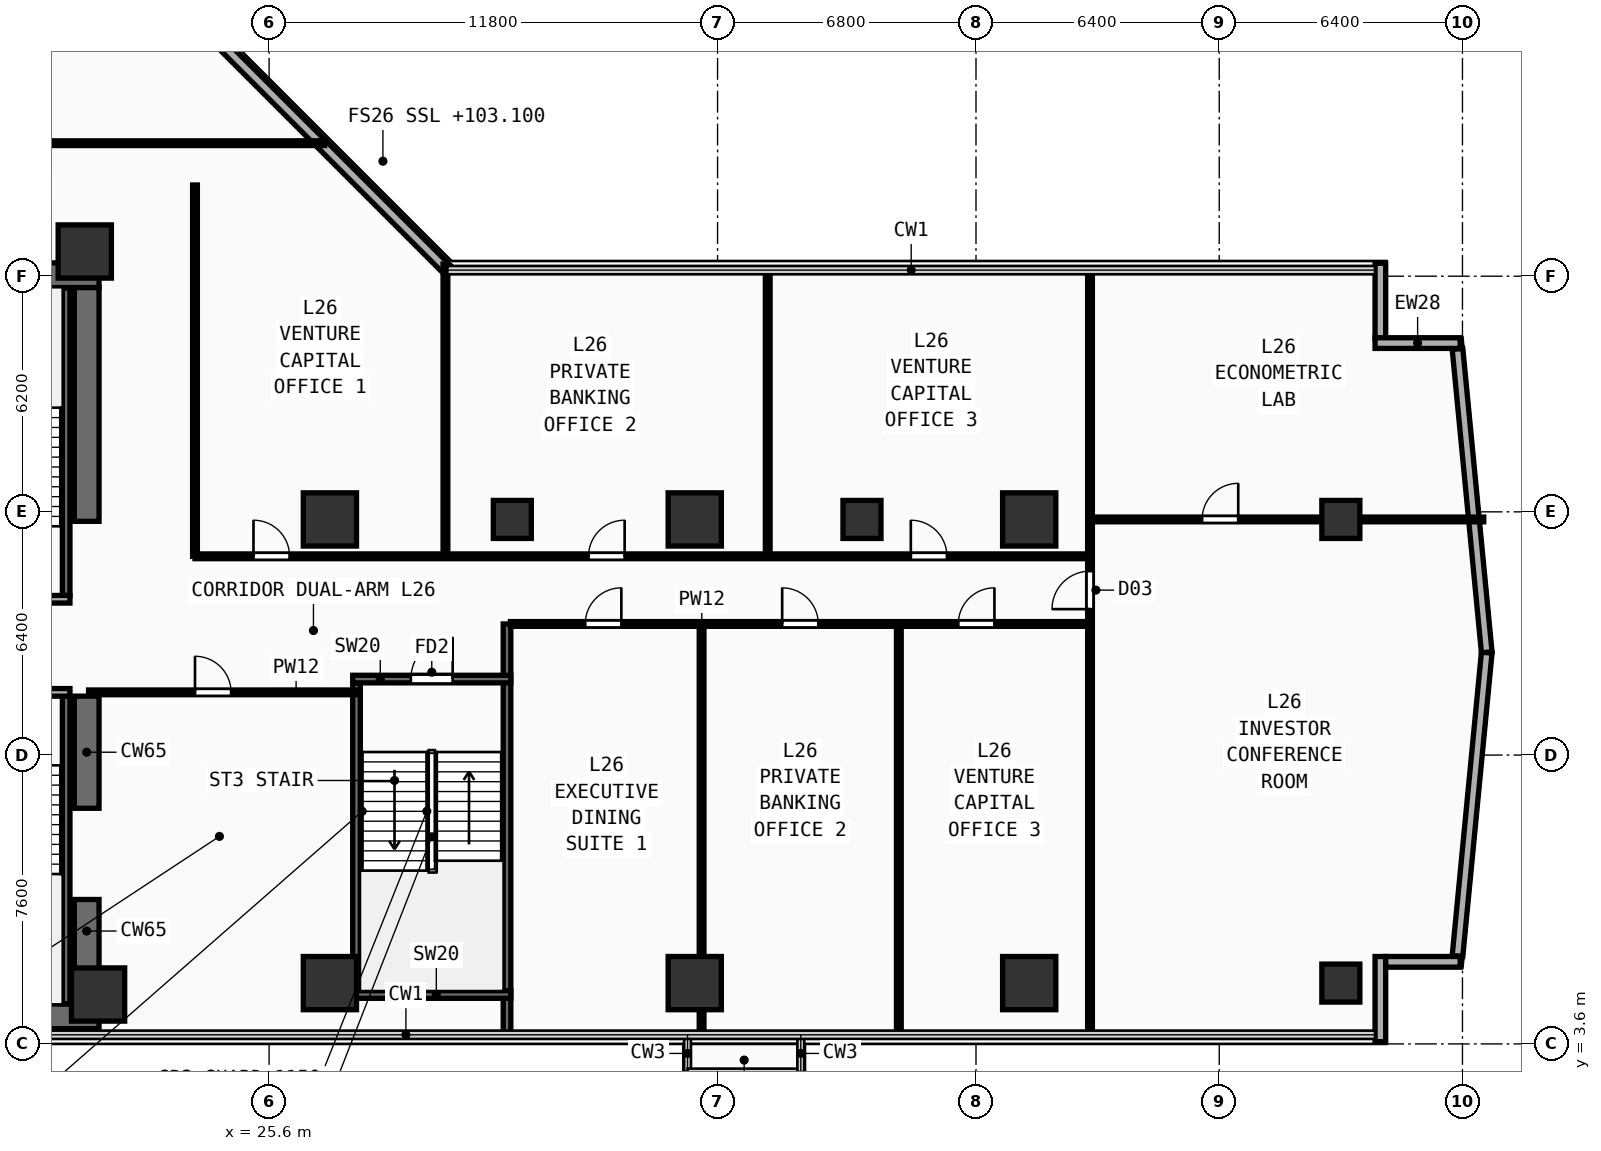
"""IFC4 building model, lengths in metres.
Left out: names, types, materials, properties, quantities, classifications, styles, units other than length and angle.
Written with IfcOpenShell. Run it as: python <this file> out.ifc"""

import sys

from ifc_helpers import new_model, si_unit, direction, frame, frame_2d, origin, origin_2d, place, context, subcontext, project, spatial, rectangle, extrude, element, fill, save


model = new_model("IFC4")
c1 = context("Model", 3, precision=1e-05, world=origin(), true_north=direction((0.0, 1.0)))
c2 = subcontext(c1, "Body", "Model", "MODEL_VIEW")
j1 = project(units=[si_unit("LENGTHUNIT", "METRE"), si_unit("PLANEANGLEUNIT", "RADIAN")], contexts=[c1])
p1 = place(None, origin())
s1 = spatial("IfcSite", under=j1, at=p1, CompositionType="ELEMENT")
p2 = place(p1, origin())
s2 = spatial("IfcBuilding", under=s1, at=p2, CompositionType="ELEMENT")
p3 = place(p2, frame((0.0, 0.0, 103.1)))
s3 = spatial("IfcBuildingStorey", under=s2, at=p3, CompositionType="ELEMENT", Elevation=103.1)
for number, where, z_axis, x_axis in (
    (1, (7.125, 4.325, 0.0), (0.0, 0.0, 1.0), (1.0, 0.0, 0.0)),
    (2, (7.125, 23.825, 0.0), (0.0, 0.0, 1.0), (1.0, 0.0, 0.0)),
):
    element("IfcWall", number, at=place(p3, frame(where, z_axis=z_axis, x_axis=x_axis)), inside=s3, PredefinedType="SHEAR", context=c2, shape_type="SweptSolid", body=[
        extrude(rectangle(XDim=14.0, YDim=0.65, at=frame_2d((7.0, 0.0))), origin(), (0.0, 0.0, 1.0), 3.54),
    ])
p4 = place(p3, frame((20.8, 4.65, 0.0), z_axis=(0.0, 0.0, 1.0), x_axis=(0.0, 1.0, 0.0)))
e3 = element("IfcWall", 3, at=p4, inside=s3, PredefinedType="SHEAR", context=c2, shape_type="SweptSolid", body=[
    extrude(rectangle(XDim=2.75, YDim=0.65, at=frame_2d((1.375, 0.0))), origin(), (0.0, 0.0, 1.0), 3.54),
])
p5 = place(p3, frame((20.8, 9.8, 0.0), z_axis=(0.0, 0.0, 1.0), x_axis=(0.0, 1.0, 0.0)))
e4 = element("IfcWall", 4, at=p5, inside=s3, PredefinedType="SHEAR", context=c2, shape_type="SweptSolid", body=[
    extrude(rectangle(XDim=2.95, YDim=0.65, at=frame_2d((1.475, 0.0))), origin(), (0.0, 0.0, 1.0), 3.54),
])
p6 = place(p3, frame((20.8, 17.35, 0.0), z_axis=(0.0, 0.0, 1.0), x_axis=(0.0, 1.0, 0.0)))
e5 = element("IfcWall", 5, at=p6, inside=s3, PredefinedType="SHEAR", context=c2, shape_type="SweptSolid", body=[
    extrude(rectangle(XDim=6.15, YDim=0.65, at=frame_2d((3.075, 0.0))), origin(), (0.0, 0.0, 1.0), 3.54),
])
for number, where, z_axis, x_axis in (
    (6, (21.1, 4.9, 0.0), (0.0, 0.0, 1.0), (1.0, 0.0, 0.0)),
    (7, (20.75, 24.45, 0.0), (0.0, 0.0, 1.0), (1.0, 0.0, 0.0)),
    (8, (27.2, 5.2, 0.0), (0.0, 0.0, 1.0), (1.0, 0.0, 0.0)),
    (9, (36.8, 5.2, 0.0), (0.0, 0.0, 1.0), (1.0, 0.0, 0.0)),
    (10, (45.6, 5.2, 0.0), (0.0, 0.0, 1.0), (1.0, 0.0, 0.0)),
    (11, (27.2, 17.4, 0.0), (0.0, 0.0, 1.0), (1.0, 0.0, 0.0)),
    (12, (36.8, 17.4, 0.0), (0.0, 0.0, 1.0), (1.0, 0.0, 0.0)),
    (13, (45.6, 17.4, 0.0), (0.0, 0.0, 1.0), (1.0, 0.0, 0.0)),
):
    element("IfcColumn", number, at=place(p3, frame(where, z_axis=z_axis, x_axis=x_axis)), inside=s3, PredefinedType="COLUMN", context=c2, shape_type="SweptSolid", body=[
        extrude(rectangle(XDim=1.4, YDim=1.4, at=origin_2d()), origin(), (0.0, 0.0, 1.0), 3.54),
    ])
for number, where, z_axis, x_axis in (
    (14, (53.8, 5.2, 0.0), (0.0, 0.0, 1.0), (1.0, 0.0, 0.0)),
    (15, (53.8, 17.4, 0.0), (0.0, 0.0, 1.0), (1.0, 0.0, 0.0)),
    (16, (32.0, 17.4, 0.0), (0.0, 0.0, 1.0), (1.0, 0.0, 0.0)),
    (17, (41.2, 17.4, 0.0), (0.0, 0.0, 1.0), (1.0, 0.0, 0.0)),
):
    element("IfcColumn", number, at=place(p3, frame(where, z_axis=z_axis, x_axis=x_axis)), inside=s3, PredefinedType="COLUMN", context=c2, shape_type="SweptSolid", body=[
        extrude(rectangle(XDim=1.0, YDim=1.0, at=origin_2d()), origin(), (0.0, 0.0, 1.0), 3.54),
    ])
p7 = place(p3, frame((54.84, 3.66, 0.0), z_axis=(0.0, 0.0, 1.0), x_axis=(0.0, 1.0, 0.0)))
e18 = element("IfcWall", 18, at=p7, inside=s3, PredefinedType="SOLIDWALL", context=c2, shape_type="SweptSolid", body=[
    extrude(rectangle(XDim=2.24, YDim=0.28, at=frame_2d((1.12, 0.0))), origin(), (0.0, 0.0, 1.0), 3.54),
])
p8 = place(p3, frame((54.98, 5.76, 0.0), z_axis=(0.0, 0.0, 1.0), x_axis=(1.0, 0.0, 0.0)))
e19 = element("IfcWall", 19, at=p8, inside=s3, PredefinedType="SOLIDWALL", context=c2, shape_type="SweptSolid", body=[
    extrude(rectangle(XDim=1.96, YDim=0.28, at=frame_2d((0.98, 0.0))), origin(), (0.0, 0.0, 1.0), 3.54),
])
p9 = place(p3, frame((54.84, 22.165, 0.0), z_axis=(0.0, 0.0, 1.0), x_axis=(0.0, 1.0, 0.0)))
e20 = element("IfcWall", 20, at=p9, inside=s3, PredefinedType="SOLIDWALL", context=c2, shape_type="SweptSolid", body=[
    extrude(rectangle(XDim=1.975, YDim=0.28, at=frame_2d((0.987, 0.0))), origin(), (0.0, 0.0, 1.0), 3.54),
])
p10 = place(p3, frame((54.7, 22.04, 0.0), z_axis=(0.0, 0.0, 1.0), x_axis=(1.0, 0.0, 0.0)))
e21 = element("IfcWall", 21, at=p10, inside=s3, PredefinedType="SOLIDWALL", context=c2, shape_type="SweptSolid", body=[
    extrude(rectangle(XDim=2.24, YDim=0.28, at=frame_2d((1.12, 0.0))), origin(), (0.0, 0.0, 1.0), 3.54),
])
p11 = place(p3, frame((30.285, 23.975, 0.0), z_axis=(0.0, 0.0, 1.0), x_axis=(-0.707106781187, 0.707106781187, 0.0)))
e22 = element("IfcWall", 22, at=p11, inside=s3, PredefinedType="SOLIDWALL", context=c2, shape_type="SweptSolid", body=[
    extrude(rectangle(XDim=9.207, YDim=0.28, at=frame_2d((4.603, 0.0))), origin(), (0.0, 0.0, 1.0), 3.54),
])
for number, where, z_axis, x_axis in (
    (23, (56.869, 5.914, 0.0), (0.0, 0.0, 1.0), (0.096, 0.995, 0.0)),
    (24, (57.639, 13.905, 0.0), (0.0, 0.0, 1.0), (-0.096, 0.995, 0.0)),
):
    element("IfcWall", number, at=place(p3, frame(where, z_axis=z_axis, x_axis=x_axis)), inside=s3, PredefinedType="SOLIDWALL", context=c2, shape_type="SweptSolid", body=[
        extrude(rectangle(XDim=8.019, YDim=0.28, at=frame_2d((4.009, 0.0))), origin(), (0.0, 0.0, 1.0), 3.54),
    ])
p12 = place(p3, frame((20.26, 4.66, 0.0), z_axis=(0.0, 0.0, 1.0), x_axis=(0.0, 1.0, 0.0)))
e25 = element("IfcWall", 25, at=p12, inside=s3, PredefinedType="SHEAR", context=c2, shape_type="SweptSolid", body=[
    extrude(rectangle(XDim=8.09, YDim=0.2, at=frame_2d((4.045, 0.0))), origin(), (0.0, 0.0, 1.0), 3.54),
])
p13 = place(p3, frame((16.4, 12.85, 0.0), z_axis=(0.0, 0.0, 1.0), x_axis=(1.0, 0.0, 0.0)))
e26 = element("IfcWall", 26, at=p13, inside=s3, PredefinedType="PARTITIONING", context=c2, shape_type="SweptSolid", body=[
    extrude(rectangle(XDim=3.96, YDim=0.2, at=frame_2d((1.98, 0.0))), origin(), (0.0, 0.0, 1.0), 3.54),
])
p14 = place(p13, frame((1.304, 0.0, 0.0)))
e27 = element("IfcOpeningElement", 27, at=p14, cuts=e26, PredefinedType="OPENING", context=c2, shape_type="SweptSolid", body=[
    extrude(rectangle(XDim=1.1, YDim=2.2, at=frame_2d((0.55, 1.1))), frame((0.0, 0.11, 0.0), z_axis=(0.0, -1.0, 0.0), x_axis=(1.0, 0.0, 0.0)), (0.0, 0.0, 1.0), 0.22),
])
p15 = place(p3, frame((20.26, 15.4, 0.0), z_axis=(0.0, 0.0, 1.0), x_axis=(0.0, 1.0, 0.0)))
e28 = element("IfcWall", 28, at=p15, inside=s3, PredefinedType="SHEAR", context=c2, shape_type="SweptSolid", body=[
    extrude(rectangle(XDim=8.09, YDim=0.2, at=frame_2d((4.045, 0.0))), origin(), (0.0, 0.0, 1.0), 3.54),
])
p16 = place(p3, frame((16.41, 15.3, 0.0), z_axis=(0.0, 0.0, 1.0), x_axis=(1.0, 0.0, 0.0)))
e29 = element("IfcWall", 29, at=p16, inside=s3, PredefinedType="PARTITIONING", context=c2, shape_type="SweptSolid", body=[
    extrude(rectangle(XDim=3.95, YDim=0.2, at=frame_2d((1.975, 0.0))), origin(), (0.0, 0.0, 1.0), 3.54),
])
p17 = place(p16, frame((1.294, 0.0, 0.0)))
e30 = element("IfcOpeningElement", 30, at=p17, cuts=e29, PredefinedType="OPENING", context=c2, shape_type="SweptSolid", body=[
    extrude(rectangle(XDim=1.1, YDim=2.2, at=frame_2d((0.55, 1.1))), frame((0.0, 0.11, 0.0), z_axis=(0.0, -1.0, 0.0), x_axis=(1.0, 0.0, 0.0)), (0.0, 0.0, 1.0), 0.22),
])
p18 = place(p3, frame((27.9, 5.0, 0.0), z_axis=(0.0, 0.0, 1.0), x_axis=(0.0, 1.0, 0.0)))
e31 = element("IfcWall", 31, at=p18, inside=s3, PredefinedType="SHEAR", context=c2, shape_type="SweptSolid", body=[
    extrude(rectangle(XDim=8.1, YDim=0.2, at=frame_2d((4.05, 0.0))), origin(), (0.0, 0.0, 1.0), 3.54),
])
p19 = place(p3, frame((31.86, 3.84, 0.0), z_axis=(0.0, 0.0, 1.0), x_axis=(0.0, 1.0, 0.0)))
e32 = element("IfcWall", 32, at=p19, inside=s3, PredefinedType="SHEAR", context=c2, shape_type="SweptSolid", body=[
    extrude(rectangle(XDim=10.81, YDim=0.2, at=frame_2d((5.405, 0.0))), origin(), (0.0, 0.0, 1.0), 3.54),
])
p20 = place(p3, frame((27.8, 4.9, 0.0), z_axis=(0.0, 0.0, 1.0), x_axis=(1.0, 0.0, 0.0)))
e33 = element("IfcWall", 33, at=p20, inside=s3, PredefinedType="SHEAR", context=c2, shape_type="SweptSolid", body=[
    extrude(rectangle(XDim=4.16, YDim=0.2, at=frame_2d((2.08, 0.0))), origin(), (0.0, 0.0, 1.0), 3.54),
])
p21 = place(p3, frame((27.8, 13.2, 0.0), z_axis=(0.0, 0.0, 1.0), x_axis=(1.0, 0.0, 0.0)))
e34 = element("IfcWall", 34, at=p21, inside=s3, PredefinedType="SHEAR", context=c2, shape_type="SweptSolid", body=[
    extrude(rectangle(XDim=4.16, YDim=0.2, at=frame_2d((2.08, 0.0))), origin(), (0.0, 0.0, 1.0), 3.54),
])
p22 = place(p21, frame((1.53, 0.0, 0.0)))
e35 = element("IfcOpeningElement", 35, at=p22, cuts=e34, PredefinedType="OPENING", context=c2, shape_type="SweptSolid", body=[
    extrude(rectangle(XDim=1.1, YDim=2.2, at=frame_2d((0.55, 1.1))), frame((0.0, 0.11, 0.0), z_axis=(0.0, -1.0, 0.0), x_axis=(1.0, 0.0, 0.0)), (0.0, 0.0, 1.0), 0.22),
])
p23 = place(p3, frame((20.85, 12.85, 0.0), z_axis=(0.0, 0.0, 1.0), x_axis=(1.0, 0.0, 0.0)))
e36 = element("IfcWall", 36, at=p23, inside=s3, PredefinedType="PARTITIONING", context=c2, shape_type="SweptSolid", body=[
    extrude(rectangle(XDim=7.05, YDim=0.125, at=frame_2d((3.525, 0.0))), origin(), (0.0, 0.0, 1.0), 3.54),
])
p24 = place(p23, frame((2.8, 0.0, 0.0)))
e37 = element("IfcOpeningElement", 37, at=p24, cuts=e36, PredefinedType="OPENING", context=c2, shape_type="SweptSolid", body=[
    extrude(rectangle(XDim=0.95, YDim=2.15, at=frame_2d((0.475, 1.075))), frame((0.0, 0.073, 0.0), z_axis=(0.0, -1.0, 0.0), x_axis=(1.0, 0.0, 0.0)), (0.0, 0.0, 1.0), 0.145),
])
p25 = place(p3, frame((31.95, 14.65, 0.0), z_axis=(0.0, 0.0, 1.0), x_axis=(1.0, 0.0, 0.0)))
e38 = element("IfcWall", 38, at=p25, inside=s3, PredefinedType="PARTITIONING", context=c2, shape_type="SweptSolid", body=[
    extrude(rectangle(XDim=15.25, YDim=0.125, at=frame_2d((7.625, 0.0))), origin(), (0.0, 0.0, 1.0), 3.54),
])
p26 = place(p25, frame((1.969, 0.0, 0.0)))
e39 = element("IfcOpeningElement", 39, at=p26, cuts=e38, PredefinedType="OPENING", context=c2, shape_type="SweptSolid", body=[
    extrude(rectangle(XDim=0.95, YDim=2.15, at=frame_2d((0.475, 1.075))), frame((0.0, 0.073, 0.0), z_axis=(0.0, -1.0, 0.0), x_axis=(1.0, 0.0, 0.0)), (0.0, 0.0, 1.0), 0.145),
])
p27 = place(p25, frame((7.15, 0.0, 0.0)))
e40 = element("IfcOpeningElement", 40, at=p27, cuts=e38, PredefinedType="OPENING", context=c2, shape_type="SweptSolid", body=[
    extrude(rectangle(XDim=0.95, YDim=2.15, at=frame_2d((0.475, 1.075))), frame((0.0, 0.073, 0.0), z_axis=(0.0, -1.0, 0.0), x_axis=(1.0, 0.0, 0.0)), (0.0, 0.0, 1.0), 0.145),
])
p28 = place(p25, frame((11.785, 0.0, 0.0)))
e41 = element("IfcOpeningElement", 41, at=p28, cuts=e38, PredefinedType="OPENING", context=c2, shape_type="SweptSolid", body=[
    extrude(rectangle(XDim=0.95, YDim=2.15, at=frame_2d((0.475, 1.075))), frame((0.0, 0.073, 0.0), z_axis=(0.0, -1.0, 0.0), x_axis=(1.0, 0.0, 0.0)), (0.0, 0.0, 1.0), 0.145),
])
p29 = place(p3, frame((36.98, 3.84, 0.0), z_axis=(0.0, 0.0, 1.0), x_axis=(0.0, 1.0, 0.0)))
e42 = element("IfcWall", 42, at=p29, inside=s3, PredefinedType="PARTITIONING", context=c2, shape_type="SweptSolid", body=[
    extrude(rectangle(XDim=10.81, YDim=0.125, at=frame_2d((5.405, 0.0))), origin(), (0.0, 0.0, 1.0), 3.04),
])
p30 = place(p3, frame((42.17, 3.84, 0.0), z_axis=(0.0, 0.0, 1.0), x_axis=(0.0, 1.0, 0.0)))
e43 = element("IfcWall", 43, at=p30, inside=s3, PredefinedType="PARTITIONING", context=c2, shape_type="SweptSolid", body=[
    extrude(rectangle(XDim=10.81, YDim=0.125, at=frame_2d((5.405, 0.0))), origin(), (0.0, 0.0, 1.0), 3.54),
])
p31 = place(p3, frame((47.2, 3.84, 0.0), z_axis=(0.0, 0.0, 1.0), x_axis=(0.0, 1.0, 0.0)))
e44 = element("IfcWall", 44, at=p31, inside=s3, PredefinedType="PARTITIONING", context=c2, shape_type="SweptSolid", body=[
    extrude(rectangle(XDim=20.12, YDim=0.125, at=frame_2d((10.06, 0.0))), origin(), (0.0, 0.0, 1.0), 3.54),
])
p32 = place(p31, frame((11.2, 0.0, 0.0)))
e45 = element("IfcOpeningElement", 45, at=p32, cuts=e44, PredefinedType="OPENING", context=c2, shape_type="SweptSolid", body=[
    extrude(rectangle(XDim=1.0, YDim=2.2, at=frame_2d((0.5, 1.1))), frame((0.0, 0.073, 0.0), z_axis=(0.0, -1.0, 0.0), x_axis=(1.0, 0.0, 0.0)), (0.0, 0.0, 1.0), 0.145),
])
p33 = place(p3, frame((47.2, 17.4, 0.0), z_axis=(0.0, 0.0, 1.0), x_axis=(1.0, 0.0, 0.0)))
e46 = element("IfcWall", 46, at=p33, inside=s3, PredefinedType="PARTITIONING", context=c2, shape_type="SweptSolid", body=[
    extrude(rectangle(XDim=10.36, YDim=0.125, at=frame_2d((5.18, 0.0))), origin(), (0.0, 0.0, 1.0), 3.24),
])
p34 = place(p33, frame((2.95, 0.0, 0.0)))
e47 = element("IfcOpeningElement", 47, at=p34, cuts=e46, PredefinedType="OPENING", context=c2, shape_type="SweptSolid", body=[
    extrude(rectangle(XDim=0.95, YDim=2.15, at=frame_2d((0.475, 1.075))), frame((0.0, 0.073, 0.0), z_axis=(0.0, -1.0, 0.0), x_axis=(1.0, 0.0, 0.0)), (0.0, 0.0, 1.0), 0.145),
])
p35 = place(p3, frame((23.65, 16.43, 0.0), z_axis=(0.0, 0.0, 1.0), x_axis=(0.0, 1.0, 0.0)))
e48 = element("IfcWall", 48, at=p35, inside=s3, PredefinedType="PARTITIONING", context=c2, shape_type="SweptSolid", body=[
    extrude(rectangle(XDim=9.77, YDim=0.125, at=frame_2d((4.885, 0.0))), origin(), (0.0, 0.0, 1.0), 3.54),
])
p36 = place(p3, frame((23.65, 16.43, 0.0), z_axis=(0.0, 0.0, 1.0), x_axis=(1.0, 0.0, 0.0)))
e49 = element("IfcWall", 49, at=p36, inside=s3, PredefinedType="PARTITIONING", context=c2, shape_type="SweptSolid", body=[
    extrude(rectangle(XDim=23.55, YDim=0.125, at=frame_2d((11.775, 0.0))), origin(), (0.0, 0.0, 1.0), 3.54),
])
p37 = place(p36, frame((1.539, 0.0, 0.0)))
e50 = element("IfcOpeningElement", 50, at=p37, cuts=e49, PredefinedType="OPENING", context=c2, shape_type="SweptSolid", body=[
    extrude(rectangle(XDim=0.95, YDim=2.15, at=frame_2d((0.475, 1.075))), frame((0.0, 0.073, 0.0), z_axis=(0.0, -1.0, 0.0), x_axis=(1.0, 0.0, 0.0)), (0.0, 0.0, 1.0), 0.145),
])
p38 = place(p36, frame((10.355, 0.0, 0.0)))
e51 = element("IfcOpeningElement", 51, at=p38, cuts=e49, PredefinedType="OPENING", context=c2, shape_type="SweptSolid", body=[
    extrude(rectangle(XDim=0.95, YDim=2.15, at=frame_2d((0.475, 1.075))), frame((0.0, 0.073, 0.0), z_axis=(0.0, -1.0, 0.0), x_axis=(1.0, 0.0, 0.0)), (0.0, 0.0, 1.0), 0.145),
])
p39 = place(p36, frame((18.835, 0.0, 0.0)))
e52 = element("IfcOpeningElement", 52, at=p39, cuts=e49, PredefinedType="OPENING", context=c2, shape_type="SweptSolid", body=[
    extrude(rectangle(XDim=0.95, YDim=2.15, at=frame_2d((0.475, 1.075))), frame((0.0, 0.073, 0.0), z_axis=(0.0, -1.0, 0.0), x_axis=(1.0, 0.0, 0.0)), (0.0, 0.0, 1.0), 0.145),
])
p40 = place(p3, frame((30.24, 16.43, 0.0), z_axis=(0.0, 0.0, 1.0), x_axis=(0.0, 1.0, 0.0)))
e53 = element("IfcWall", 53, at=p40, inside=s3, PredefinedType="PARTITIONING", context=c2, shape_type="SweptSolid", body=[
    extrude(rectangle(XDim=7.69, YDim=0.125, at=frame_2d((3.845, 0.0))), origin(), (0.0, 0.0, 1.0), 3.54),
])
p41 = place(p3, frame((38.72, 16.43, 0.0), z_axis=(0.0, 0.0, 1.0), x_axis=(0.0, 1.0, 0.0)))
e54 = element("IfcWall", 54, at=p41, inside=s3, PredefinedType="PARTITIONING", context=c2, shape_type="SweptSolid", body=[
    extrude(rectangle(XDim=7.53, YDim=0.125, at=frame_2d((3.765, 0.0))), origin(), (0.0, 0.0, 1.0), 3.54),
])
p42 = place(p3, frame((10.03, 27.3, 0.0), z_axis=(0.0, 0.0, 1.0), x_axis=(1.0, 0.0, 0.0)))
e55 = element("IfcWall", 55, at=p42, inside=s3, PredefinedType="PARTITIONING", context=c2, shape_type="SweptSolid", body=[
    extrude(rectangle(XDim=17.03, YDim=0.125, at=frame_2d((8.515, 0.0))), origin(), (0.0, 0.0, 1.0), 3.54),
])
p43 = place(p22, frame((1.1, 0.0, 0.0), z_axis=(0.0, 0.0, 1.0), x_axis=(-1.0, 0.0, 0.0)))
e56 = element("IfcDoor", 56, at=p43, inside=s3, OperationType="SINGLE_SWING_LEFT", PredefinedType="DOOR", context=c2, shape_type="SweptSolid", body=[
    extrude(rectangle(XDim=1.1, YDim=2.2, at=frame_2d((0.55, 1.1))), frame((0.0, 0.025, 0.0), z_axis=(0.0, -1.0, 0.0), x_axis=(1.0, 0.0, 0.0)), (0.0, 0.0, 1.0), 0.05),
])
fill(e35, e56)
p44 = place(p24, origin())
e57 = element("IfcDoor", 57, at=p44, inside=s3, OperationType="SINGLE_SWING_LEFT", PredefinedType="DOOR", context=c2, shape_type="SweptSolid", body=[
    extrude(rectangle(XDim=0.95, YDim=2.15, at=frame_2d((0.475, 1.075))), frame((0.0, 0.025, 0.0), z_axis=(0.0, -1.0, 0.0), x_axis=(1.0, 0.0, 0.0)), (0.0, 0.0, 1.0), 0.05),
])
fill(e37, e57)
p45 = place(p26, origin())
e58 = element("IfcDoor", 58, at=p45, inside=s3, OperationType="SINGLE_SWING_RIGHT", PredefinedType="DOOR", context=c2, shape_type="SweptSolid", body=[
    extrude(rectangle(XDim=0.95, YDim=2.15, at=frame_2d((0.475, 1.075))), frame((0.0, 0.025, 0.0), z_axis=(0.0, -1.0, 0.0), x_axis=(1.0, 0.0, 0.0)), (0.0, 0.0, 1.0), 0.05),
])
fill(e39, e58)
p46 = place(p27, origin())
e59 = element("IfcDoor", 59, at=p46, inside=s3, OperationType="SINGLE_SWING_LEFT", PredefinedType="DOOR", context=c2, shape_type="SweptSolid", body=[
    extrude(rectangle(XDim=0.95, YDim=2.15, at=frame_2d((0.475, 1.075))), frame((0.0, 0.025, 0.0), z_axis=(0.0, -1.0, 0.0), x_axis=(1.0, 0.0, 0.0)), (0.0, 0.0, 1.0), 0.05),
])
fill(e40, e59)
p47 = place(p28, origin())
e60 = element("IfcDoor", 60, at=p47, inside=s3, OperationType="SINGLE_SWING_RIGHT", PredefinedType="DOOR", context=c2, shape_type="SweptSolid", body=[
    extrude(rectangle(XDim=0.95, YDim=2.15, at=frame_2d((0.475, 1.075))), frame((0.0, 0.025, 0.0), z_axis=(0.0, -1.0, 0.0), x_axis=(1.0, 0.0, 0.0)), (0.0, 0.0, 1.0), 0.05),
])
fill(e41, e60)
p48 = place(p32, origin())
e61 = element("IfcDoor", 61, at=p48, inside=s3, OperationType="SINGLE_SWING_LEFT", PredefinedType="DOOR", context=c2, shape_type="SweptSolid", body=[
    extrude(rectangle(XDim=1.0, YDim=2.2, at=frame_2d((0.5, 1.1))), frame((0.0, 0.025, 0.0), z_axis=(0.0, -1.0, 0.0), x_axis=(1.0, 0.0, 0.0)), (0.0, 0.0, 1.0), 0.05),
])
fill(e45, e61)
p49 = place(p34, origin())
e62 = element("IfcDoor", 62, at=p49, inside=s3, OperationType="SINGLE_SWING_RIGHT", PredefinedType="DOOR", context=c2, shape_type="SweptSolid", body=[
    extrude(rectangle(XDim=0.95, YDim=2.15, at=frame_2d((0.475, 1.075))), frame((0.0, 0.025, 0.0), z_axis=(0.0, -1.0, 0.0), x_axis=(1.0, 0.0, 0.0)), (0.0, 0.0, 1.0), 0.05),
])
fill(e47, e62)
p50 = place(p37, origin())
e63 = element("IfcDoor", 63, at=p50, inside=s3, OperationType="SINGLE_SWING_LEFT", PredefinedType="DOOR", context=c2, shape_type="SweptSolid", body=[
    extrude(rectangle(XDim=0.95, YDim=2.15, at=frame_2d((0.475, 1.075))), frame((0.0, 0.025, 0.0), z_axis=(0.0, -1.0, 0.0), x_axis=(1.0, 0.0, 0.0)), (0.0, 0.0, 1.0), 0.05),
])
fill(e50, e63)
p51 = place(p38, origin())
e64 = element("IfcDoor", 64, at=p51, inside=s3, OperationType="SINGLE_SWING_RIGHT", PredefinedType="DOOR", context=c2, shape_type="SweptSolid", body=[
    extrude(rectangle(XDim=0.95, YDim=2.15, at=frame_2d((0.475, 1.075))), frame((0.0, 0.025, 0.0), z_axis=(0.0, -1.0, 0.0), x_axis=(1.0, 0.0, 0.0)), (0.0, 0.0, 1.0), 0.05),
])
fill(e51, e64)
p52 = place(p39, origin())
e65 = element("IfcDoor", 65, at=p52, inside=s3, OperationType="SINGLE_SWING_LEFT", PredefinedType="DOOR", context=c2, shape_type="SweptSolid", body=[
    extrude(rectangle(XDim=0.95, YDim=2.15, at=frame_2d((0.475, 1.075))), frame((0.0, 0.025, 0.0), z_axis=(0.0, -1.0, 0.0), x_axis=(1.0, 0.0, 0.0)), (0.0, 0.0, 1.0), 0.05),
])
fill(e52, e65)
save(model, sys.argv[1])
